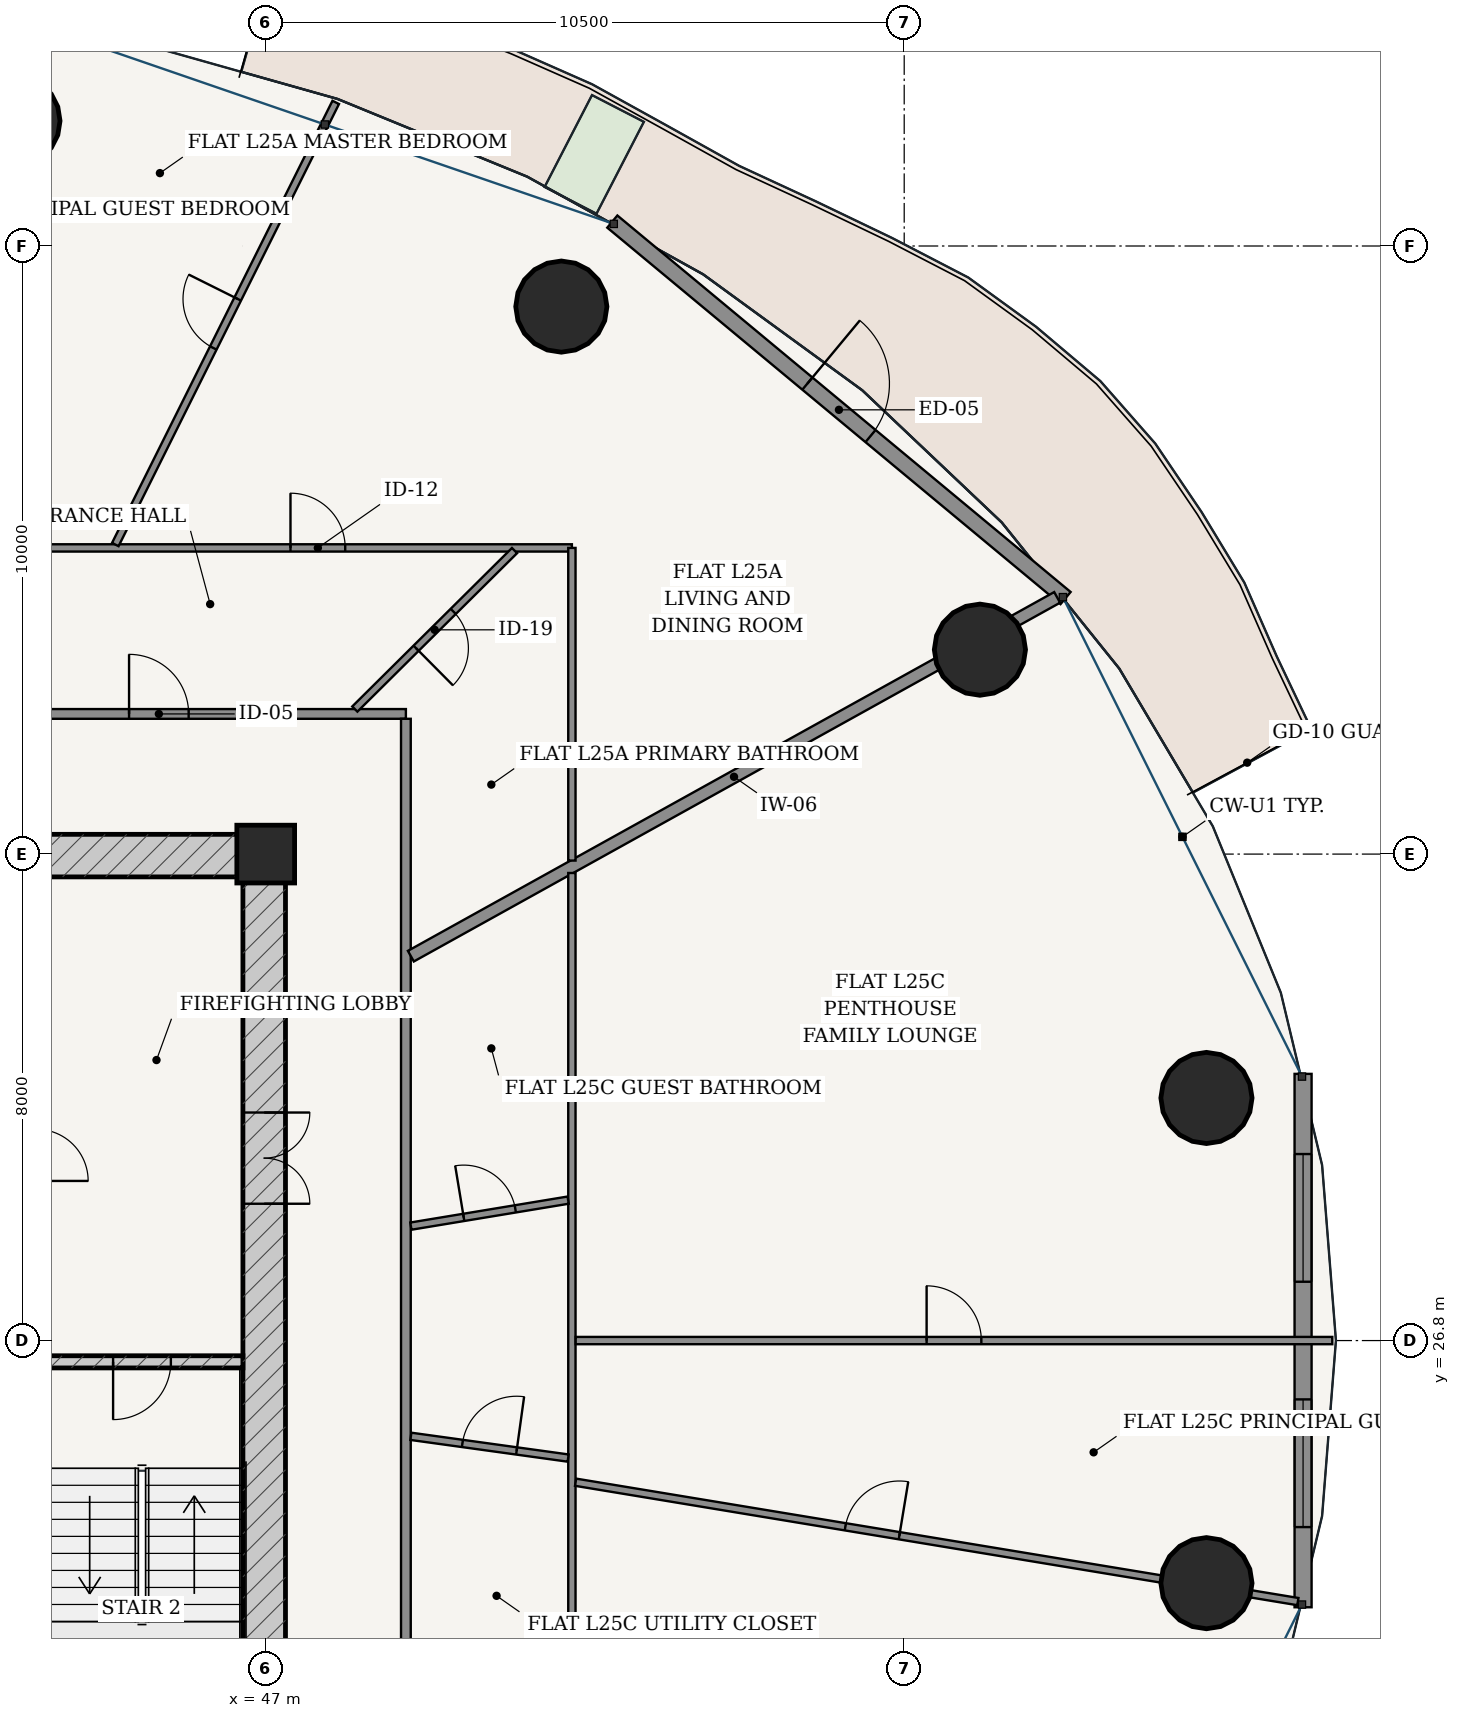
"""IFC4 building model, lengths in metres.
Left out: names, types, materials, properties, quantities, classifications, styles, units other than length and angle.
Written with IfcOpenShell. Run it as: python <this file> out.ifc"""

import sys

from ifc_helpers import new_model, si_unit, direction, frame, frame_2d, origin, origin_2d, place, context, subcontext, project, spatial, rectangle, hollow_circle, extrude, source, transform, mapped, element, fill, save


model = new_model("IFC4")
c1 = context("Model", 3, precision=1e-05, world=origin(), true_north=direction((-0.2419218956, 0.970295726276)))
c2 = subcontext(c1, "Body", "Model", "MODEL_VIEW")
j1 = project(units=[si_unit("LENGTHUNIT", "METRE"), si_unit("PLANEANGLEUNIT", "RADIAN")], contexts=[c1])
p1 = place(None, origin())
s1 = spatial("IfcSite", under=j1, at=p1, CompositionType="ELEMENT")
p2 = place(p1, origin())
s2 = spatial("IfcBuilding", under=s1, at=p2, CompositionType="ELEMENT")
p3 = place(p2, frame((0.0, 0.0, 97.8)))
s3 = spatial("IfcBuildingStorey", under=s2, at=p3, CompositionType="ELEMENT", Elevation=97.8)
p4 = place(p3, frame((47.0, 34.8, 0.0), z_axis=(0.0, 0.0, 1.0), x_axis=(1.0, 0.0, 0.0)))
e1 = element("IfcColumn", 1, at=p4, inside=s3, PredefinedType="COLUMN", context=c2, shape_type="SweptSolid", body=[
    extrude(rectangle(XDim=0.95, YDim=0.95, at=origin_2d()), origin(), (0.0, 0.0, 1.0), 3.6),
])
p5 = place(p3, frame((28.675, 34.775, 0.0), z_axis=(0.0, 0.0, 1.0), x_axis=(1.0, 0.0, 0.0)))
e2 = element("IfcWall", 2, at=p5, inside=s3, PredefinedType="SHEAR", context=c2, shape_type="SweptSolid", body=[
    extrude(rectangle(XDim=18.65, YDim=0.7, at=frame_2d((9.325, 0.0))), origin(), (0.0, 0.0, 1.0), 3.325),
])
p6 = place(p5, frame((8.9, 0.0, 0.0)))
e3 = element("IfcOpeningElement", 3, at=p6, cuts=e2, PredefinedType="OPENING", context=c2, shape_type="SweptSolid", body=[
    extrude(rectangle(XDim=0.85, YDim=2.1, at=frame_2d((0.425, 1.05))), frame((0.0, 0.36, 0.0), z_axis=(0.0, -1.0, 0.0), x_axis=(1.0, 0.0, 0.0)), (0.0, 0.0, 1.0), 0.72),
])
p7 = place(p3, frame((46.975, 19.175, 0.0), z_axis=(0.0, 0.0, 1.0), x_axis=(0.0, 1.0, 0.0)))
e4 = element("IfcWall", 4, at=p7, inside=s3, PredefinedType="SHEAR", context=c2, shape_type="SweptSolid", body=[
    extrude(rectangle(XDim=15.25, YDim=0.7, at=frame_2d((7.625, 0.0))), origin(), (0.0, 0.0, 1.0), 3.325),
])
p8 = place(p7, frame((9.875, 0.0, 0.0)))
e5 = element("IfcOpeningElement", 5, at=p8, cuts=e4, PredefinedType="OPENING", context=c2, shape_type="SweptSolid", body=[
    extrude(rectangle(XDim=1.5, YDim=2.2, at=frame_2d((0.75, 1.1))), frame((0.0, 0.36, 0.0), z_axis=(0.0, -1.0, 0.0), x_axis=(1.0, 0.0, 0.0)), (0.0, 0.0, 1.0), 0.72),
])
p9 = place(p3, frame((43.305, 26.45, 0.0), z_axis=(0.0, 0.0, 1.0), x_axis=(1.0, 0.0, 0.0)))
e6 = element("IfcWall", 6, at=p9, inside=s3, PredefinedType="SOLIDWALL", context=c2, shape_type="SweptSolid", body=[
    extrude(rectangle(XDim=3.32, YDim=0.2, at=frame_2d((1.66, 0.0))), origin(), (0.0, 0.0, 1.0), 3.325),
])
p10 = place(p9, frame((1.185, 0.0, 0.0)))
e7 = element("IfcOpeningElement", 7, at=p10, cuts=e6, PredefinedType="OPENING", context=c2, shape_type="SweptSolid", body=[
    extrude(rectangle(XDim=0.95, YDim=2.15, at=frame_2d((0.475, 1.075))), frame((0.0, 0.11, 0.0), z_axis=(0.0, -1.0, 0.0), x_axis=(1.0, 0.0, 0.0)), (0.0, 0.0, 1.0), 0.22),
])
for number, where, z_axis, x_axis in (
    (8, (62.471, 30.79, 0.0), (0.0, 0.0, 1.0), (1.0, 0.0, 0.0)),
    (9, (58.745, 38.161, 0.0), (0.0, 0.0, 1.0), (1.0, 0.0, 0.0)),
    (10, (51.862, 43.803, 0.0), (0.0, 0.0, 1.0), (1.0, 0.0, 0.0)),
    (11, (42.867, 46.857, 0.0), (0.0, 0.0, 1.0), (1.0, 0.0, 0.0)),
    (12, (62.471, 22.81, 0.0), (0.0, 0.0, 1.0), (1.0, 0.0, 0.0)),
):
    element("IfcColumn", number, at=place(p3, frame(where, z_axis=z_axis, x_axis=x_axis)), inside=s3, PredefinedType="COLUMN", context=c2, shape_type="SweptSolid", body=[
        extrude(hollow_circle(Radius=0.75, WallThickness=0.045, at=origin_2d()), origin(), (0.0, 0.0, 1.0), 3.6),
    ])
p11 = place(p3, frame((60.154, 39.01, 0.0), z_axis=(0.0, 0.0, 1.0), x_axis=(-0.769242574941, 0.638956853706, 0.0)))
e13 = element("IfcWall", 13, at=p11, inside=s3, PredefinedType="SOLIDWALL", context=c2, shape_type="SweptSolid", body=[
    extrude(rectangle(XDim=9.69, YDim=0.26, at=frame_2d((4.845, 0.0))), origin(), (0.0, 0.0, 1.0), 3.325),
])
p12 = place(p11, frame((4.17, 0.0, 0.0)))
e14 = element("IfcOpeningElement", 14, at=p12, cuts=e13, PredefinedType="OPENING", context=c2, shape_type="SweptSolid", body=[
    extrude(rectangle(XDim=1.35, YDim=2.2, at=frame_2d((0.675, 1.1))), frame((0.0, 0.14, 0.0), z_axis=(0.0, -1.0, 0.0), x_axis=(1.0, 0.0, 0.0)), (0.0, 0.0, 1.0), 0.28),
])
p13 = place(p3, frame((64.06, 22.414, 0.0), z_axis=(0.0, 0.0, 1.0), x_axis=(0.0, 1.0, 0.0)))
e15 = element("IfcWall", 15, at=p13, inside=s3, PredefinedType="SOLIDWALL", context=c2, shape_type="SweptSolid", body=[
    extrude(rectangle(XDim=8.771, YDim=0.28, at=frame_2d((4.386, 0.0))), origin(), (0.0, 0.0, 1.0), 3.325),
])
p14 = place(p13, frame((1.318, 0.0, 0.85)))
e16 = element("IfcOpeningElement", 16, at=p14, cuts=e15, PredefinedType="OPENING", context=c2, shape_type="SweptSolid", body=[
    extrude(rectangle(XDim=2.1, YDim=1.95, at=frame_2d((1.05, 0.975))), frame((0.0, 0.15, 0.0), z_axis=(0.0, -1.0, 0.0), x_axis=(1.0, 0.0, 0.0)), (0.0, 0.0, 1.0), 0.3),
])
p15 = place(p13, frame((5.353, 0.0, 0.85)))
e17 = element("IfcOpeningElement", 17, at=p15, cuts=e15, PredefinedType="OPENING", context=c2, shape_type="SweptSolid", body=[
    extrude(rectangle(XDim=2.1, YDim=1.95, at=frame_2d((1.05, 0.975))), frame((0.0, 0.15, 0.0), z_axis=(0.0, -1.0, 0.0), x_axis=(1.0, 0.0, 0.0)), (0.0, 0.0, 1.0), 0.3),
])
p16 = place(p3, frame((26.695, 37.105, 0.0), z_axis=(0.0, 0.0, 1.0), x_axis=(1.0, 0.0, 0.0)))
e18 = element("IfcWall", 18, at=p16, inside=s3, PredefinedType="PARTITIONING", context=c2, shape_type="SweptSolid", body=[
    extrude(rectangle(XDim=22.61, YDim=0.16, at=frame_2d((11.305, 0.0))), origin(), (0.0, 0.0, 1.0), 2.767),
])
p17 = place(p16, frame((18.058, 0.0, 0.0)))
e19 = element("IfcOpeningElement", 19, at=p17, cuts=e18, PredefinedType="OPENING", context=c2, shape_type="SweptSolid", body=[
    extrude(rectangle(XDim=0.98, YDim=2.2, at=frame_2d((0.49, 1.1))), frame((0.0, 0.09, 0.0), z_axis=(0.0, -1.0, 0.0), x_axis=(1.0, 0.0, 0.0)), (0.0, 0.0, 1.0), 0.18),
])
p18 = place(p3, frame((49.305, 16.575, 0.0), z_axis=(0.0, 0.0, 1.0), x_axis=(0.0, 1.0, 0.0)))
e20 = element("IfcWall", 20, at=p18, inside=s3, PredefinedType="PARTITIONING", context=c2, shape_type="SweptSolid", body=[
    extrude(rectangle(XDim=20.45, YDim=0.16, at=frame_2d((10.225, 0.0))), origin(), (0.0, 0.0, 1.0), 2.767),
])
p19 = place(p3, frame((49.387, 33.121, 0.0), z_axis=(0.0, 0.0, 1.0), x_axis=(0.874320165728, 0.485349613992, 0.0)))
e21 = element("IfcWall", 21, at=p19, inside=s3, PredefinedType="PARTITIONING", context=c2, shape_type="SweptSolid", body=[
    extrude(rectangle(XDim=12.156, YDim=0.2, at=frame_2d((6.078, 0.0))), origin(), (0.0, 0.0, 1.0), 2.767),
])
p20 = place(p3, frame((23.965, 39.835, 0.0), z_axis=(0.0, 0.0, 1.0), x_axis=(1.0, 0.0, 0.0)))
e22 = element("IfcWall", 22, at=p20, inside=s3, PredefinedType="PARTITIONING", context=c2, shape_type="SweptSolid", body=[
    extrude(rectangle(XDim=28.07, YDim=0.12, at=frame_2d((14.035, 0.0))), origin(), (0.0, 0.0, 1.0), 2.767),
])
p21 = place(p20, frame((23.442, 0.0, 0.0)))
e23 = element("IfcOpeningElement", 23, at=p21, cuts=e22, PredefinedType="OPENING", context=c2, shape_type="SweptSolid", body=[
    extrude(rectangle(XDim=0.9, YDim=2.15, at=frame_2d((0.45, 1.075))), frame((0.0, 0.07, 0.0), z_axis=(0.0, -1.0, 0.0), x_axis=(1.0, 0.0, 0.0)), (0.0, 0.0, 1.0), 0.14),
])
p22 = place(p3, frame((52.035, 39.835, 0.0), z_axis=(0.0, 0.0, 1.0), x_axis=(0.0, -1.0, 0.0)))
e24 = element("IfcWall", 24, at=p22, inside=s3, PredefinedType="PARTITIONING", context=c2, shape_type="SweptSolid", body=[
    extrude(rectangle(XDim=5.142, YDim=0.12, at=frame_2d((2.571, 0.0))), origin(), (0.0, 0.0, 1.0), 3.004),
])
p23 = place(p3, frame((44.526, 39.89, 0.0), z_axis=(0.0, 0.0, 1.0), x_axis=(0.446167584581, 0.894949432353, 0.0)))
e25 = element("IfcWall", 25, at=p23, inside=s3, PredefinedType="PARTITIONING", context=c2, shape_type="SweptSolid", body=[
    extrude(rectangle(XDim=8.125, YDim=0.12, at=frame_2d((4.062, 0.0))), origin(), (0.0, 0.0, 1.0), 2.767),
])
p24 = place(p23, frame((3.612, 0.0, 0.0)))
e26 = element("IfcOpeningElement", 26, at=p24, cuts=e25, PredefinedType="OPENING", context=c2, shape_type="SweptSolid", body=[
    extrude(rectangle(XDim=0.9, YDim=2.15, at=frame_2d((0.45, 1.075))), frame((0.0, 0.07, 0.0), z_axis=(0.0, -1.0, 0.0), x_axis=(1.0, 0.0, 0.0)), (0.0, 0.0, 1.0), 0.14),
])
p25 = place(p3, frame((48.465, 37.185, 0.0), z_axis=(0.0, 0.0, 1.0), x_axis=(0.709839752998, 0.704363205359, 0.0)))
e27 = element("IfcWall", 27, at=p25, inside=s3, PredefinedType="PARTITIONING", context=c2, shape_type="SweptSolid", body=[
    extrude(rectangle(XDim=3.7, YDim=0.12, at=frame_2d((1.85, 0.0))), origin(), (0.0, 0.0, 1.0), 2.767),
])
p26 = place(p25, frame((1.42, 0.0, 0.0)))
e28 = element("IfcOpeningElement", 28, at=p26, cuts=e27, PredefinedType="OPENING", context=c2, shape_type="SweptSolid", body=[
    extrude(rectangle(XDim=0.86, YDim=2.15, at=frame_2d((0.43, 1.075))), frame((0.0, 0.07, 0.0), z_axis=(0.0, -1.0, 0.0), x_axis=(1.0, 0.0, 0.0)), (0.0, 0.0, 1.0), 0.14),
])
p27 = place(p3, frame((52.035, 34.49, 0.0), z_axis=(0.0, 0.0, 1.0), x_axis=(0.0, -1.0, 0.0)))
e29 = element("IfcWall", 29, at=p27, inside=s3, PredefinedType="PARTITIONING", context=c2, shape_type="SweptSolid", body=[
    extrude(rectangle(XDim=20.725, YDim=0.12, at=frame_2d((10.362, 0.0))), origin(), (0.0, 0.0, 1.0), 2.767),
])
p28 = place(p27, frame((17.493, 0.0, 0.0)))
e30 = element("IfcOpeningElement", 30, at=p28, cuts=e29, PredefinedType="OPENING", context=c2, shape_type="SweptSolid", body=[
    extrude(rectangle(XDim=0.9, YDim=2.15, at=frame_2d((0.45, 1.075))), frame((0.0, 0.07, 0.0), z_axis=(0.0, -1.0, 0.0), x_axis=(1.0, 0.0, 0.0)), (0.0, 0.0, 1.0), 0.14),
])
p29 = place(p27, frame((14.064, 0.0, 0.0)))
e31 = element("IfcOpeningElement", 31, at=p29, cuts=e29, PredefinedType="OPENING", context=c2, shape_type="SweptSolid", body=[
    extrude(rectangle(XDim=0.9, YDim=2.15, at=frame_2d((0.45, 1.075))), frame((0.0, 0.07, 0.0), z_axis=(0.0, -1.0, 0.0), x_axis=(1.0, 0.0, 0.0)), (0.0, 0.0, 1.0), 0.14),
])
p30 = place(p3, frame((52.094, 21.95, 0.0), z_axis=(0.0, 0.0, 1.0), x_axis=(0.945573120726, -0.32540970078, 0.0)))
e32 = element("IfcWall", 32, at=p30, inside=s3, PredefinedType="PARTITIONING", context=c2, shape_type="SweptSolid", body=[
    extrude(rectangle(XDim=11.022, YDim=0.12, at=frame_2d((5.511, 0.0))), origin(), (0.0, 0.0, 1.0), 2.767),
])
p31 = place(p30, frame((5.061, 0.0, 0.0)))
e33 = element("IfcOpeningElement", 33, at=p31, cuts=e32, PredefinedType="OPENING", context=c2, shape_type="SweptSolid", body=[
    extrude(rectangle(XDim=0.9, YDim=2.15, at=frame_2d((0.45, 1.075))), frame((0.0, 0.07, 0.0), z_axis=(0.0, -1.0, 0.0), x_axis=(1.0, 0.0, 0.0)), (0.0, 0.0, 1.0), 0.14),
])
p32 = place(p3, frame((52.096, 24.47, 0.0), z_axis=(0.0, 0.0, 1.0), x_axis=(0.986618264768, -0.163047231274, 0.0)))
e34 = element("IfcWall", 34, at=p32, inside=s3, PredefinedType="PARTITIONING", context=c2, shape_type="SweptSolid", body=[
    extrude(rectangle(XDim=12.039, YDim=0.12, at=frame_2d((6.02, 0.0))), origin(), (0.0, 0.0, 1.0), 2.767),
])
p33 = place(p32, frame((4.496, 0.0, 0.0)))
e35 = element("IfcOpeningElement", 35, at=p33, cuts=e34, PredefinedType="OPENING", context=c2, shape_type="SweptSolid", body=[
    extrude(rectangle(XDim=0.9, YDim=2.15, at=frame_2d((0.45, 1.075))), frame((0.0, 0.07, 0.0), z_axis=(0.0, -1.0, 0.0), x_axis=(1.0, 0.0, 0.0)), (0.0, 0.0, 1.0), 0.14),
])
p34 = place(p3, frame((52.097, 26.8, 0.0), z_axis=(0.0, 0.0, 1.0), x_axis=(1.0, 0.0, 0.0)))
e36 = element("IfcWall", 36, at=p34, inside=s3, PredefinedType="PARTITIONING", context=c2, shape_type="SweptSolid", body=[
    extrude(rectangle(XDim=12.443, YDim=0.12, at=frame_2d((6.222, 0.0))), origin(), (0.0, 0.0, 1.0), 2.767),
])
p35 = place(p34, frame((5.771, 0.0, 0.0)))
e37 = element("IfcOpeningElement", 37, at=p35, cuts=e36, PredefinedType="OPENING", context=c2, shape_type="SweptSolid", body=[
    extrude(rectangle(XDim=0.9, YDim=2.15, at=frame_2d((0.45, 1.075))), frame((0.0, 0.07, 0.0), z_axis=(0.0, -1.0, 0.0), x_axis=(1.0, 0.0, 0.0)), (0.0, 0.0, 1.0), 0.14),
])
p36 = place(p3, frame((49.387, 25.225, 0.0), z_axis=(0.0, 0.0, 1.0), x_axis=(0.990575253555, -0.136969584375, 0.0)))
e38 = element("IfcWall", 38, at=p36, inside=s3, PredefinedType="PARTITIONING", context=c2, shape_type="SweptSolid", body=[
    extrude(rectangle(XDim=2.611, YDim=0.12, at=frame_2d((1.306, 0.0))), origin(), (0.0, 0.0, 1.0), 3.325),
])
p37 = place(p36, frame((0.856, 0.0, 0.0)))
e39 = element("IfcOpeningElement", 39, at=p37, cuts=e38, PredefinedType="OPENING", context=c2, shape_type="SweptSolid", body=[
    extrude(rectangle(XDim=0.9, YDim=2.15, at=frame_2d((0.45, 1.075))), frame((0.0, 0.07, 0.0), z_axis=(0.0, -1.0, 0.0), x_axis=(1.0, 0.0, 0.0)), (0.0, 0.0, 1.0), 0.14),
])
p38 = place(p3, frame((49.387, 28.682, 0.0), z_axis=(0.0, 0.0, 1.0), x_axis=(0.986619477472, 0.163039892889, 0.0)))
e40 = element("IfcWall", 40, at=p38, inside=s3, PredefinedType="PARTITIONING", context=c2, shape_type="SweptSolid", body=[
    extrude(rectangle(XDim=2.622, YDim=0.12, at=frame_2d((1.311, 0.0))), origin(), (0.0, 0.0, 1.0), 2.767),
])
p39 = place(p38, frame((0.881, 0.0, 0.0)))
e41 = element("IfcOpeningElement", 41, at=p39, cuts=e40, PredefinedType="OPENING", context=c2, shape_type="SweptSolid", body=[
    extrude(rectangle(XDim=0.86, YDim=2.15, at=frame_2d((0.43, 1.075))), frame((0.0, 0.07, 0.0), z_axis=(0.0, -1.0, 0.0), x_axis=(1.0, 0.0, 0.0)), (0.0, 0.0, 1.0), 0.14),
])
m1 = source(origin(), c2, "Body", "SweptSolid", [
    extrude(rectangle(XDim=1.35, YDim=2.2, at=frame_2d((0.675, 1.1))), frame((0.0, 0.025, 0.0), z_axis=(0.0, -1.0, 0.0), x_axis=(1.0, 0.0, 0.0)), (0.0, 0.0, 1.0), 0.05),
])
p40 = place(p12, frame((1.35, 0.0, 0.0), z_axis=(0.0, 0.0, 1.0), x_axis=(-1.0, 0.0, 0.0)))
e42 = element("IfcDoor", 42, at=p40, inside=s3, OperationType="SINGLE_SWING_LEFT", PredefinedType="DOOR", context=c2, shape_type="MappedRepresentation", body=[
    mapped(m1, transform((0.0, 0.0, 0.0), scale=1.0)),
])
fill(e14, e42)
m2 = source(origin(), c2, "Body", "SweptSolid", [
    extrude(rectangle(XDim=2.1, YDim=1.95, at=frame_2d((1.05, 0.975))), frame((0.0, 0.03, 0.0), z_axis=(0.0, -1.0, 0.0), x_axis=(1.0, 0.0, 0.0)), (0.0, 0.0, 1.0), 0.06),
])
p41 = place(p14, origin())
e43 = element("IfcWindow", 43, at=p41, inside=s3, PartitioningType="SINGLE_PANEL", PredefinedType="WINDOW", context=c2, shape_type="MappedRepresentation", body=[
    mapped(m2, transform((0.0, 0.0, 0.0), scale=1.0)),
])
fill(e16, e43)
p42 = place(p15, origin())
e44 = element("IfcWindow", 44, at=p42, inside=s3, PartitioningType="SINGLE_PANEL", PredefinedType="WINDOW", context=c2, shape_type="MappedRepresentation", body=[
    mapped(m2, transform((0.0, 0.0, 0.0), scale=1.0)),
])
fill(e17, e44)
m3 = source(origin(), c2, "Body", "SweptSolid", [
    extrude(rectangle(XDim=1.5, YDim=2.2, at=frame_2d((0.75, 1.1))), frame((0.0, 0.025, 0.0), z_axis=(0.0, -1.0, 0.0), x_axis=(1.0, 0.0, 0.0)), (0.0, 0.0, 1.0), 0.05),
])
p43 = place(p8, frame((1.5, 0.0, 0.0), z_axis=(0.0, 0.0, 1.0), x_axis=(-1.0, 0.0, 0.0)))
e45 = element("IfcDoor", 45, at=p43, inside=s3, OperationType="DOUBLE_DOOR_SINGLE_SWING", PredefinedType="DOOR", context=c2, shape_type="MappedRepresentation", body=[
    mapped(m3, transform((0.0, 0.0, 0.0), scale=1.0)),
])
fill(e5, e45)
m4 = source(origin(), c2, "Body", "SweptSolid", [
    extrude(rectangle(XDim=0.95, YDim=2.15, at=frame_2d((0.475, 1.075))), frame((0.0, 0.025, 0.0), z_axis=(0.0, -1.0, 0.0), x_axis=(1.0, 0.0, 0.0)), (0.0, 0.0, 1.0), 0.05),
])
p44 = place(p10, frame((0.95, 0.0, 0.0), z_axis=(0.0, 0.0, 1.0), x_axis=(-1.0, 0.0, 0.0)))
e46 = element("IfcDoor", 46, at=p44, inside=s3, OperationType="SINGLE_SWING_RIGHT", PredefinedType="DOOR", context=c2, shape_type="MappedRepresentation", body=[
    mapped(m4, transform((0.0, 0.0, 0.0), scale=1.0)),
])
fill(e7, e46)
m5 = source(origin(), c2, "Body", "SweptSolid", [
    extrude(rectangle(XDim=0.98, YDim=2.2, at=frame_2d((0.49, 1.1))), frame((0.0, 0.025, 0.0), z_axis=(0.0, -1.0, 0.0), x_axis=(1.0, 0.0, 0.0)), (0.0, 0.0, 1.0), 0.05),
])
p45 = place(p17, origin())
e47 = element("IfcDoor", 47, at=p45, inside=s3, OperationType="SINGLE_SWING_LEFT", PredefinedType="DOOR", context=c2, shape_type="MappedRepresentation", body=[
    mapped(m5, transform((0.0, 0.0, 0.0), scale=1.0)),
])
fill(e19, e47)
m6 = source(origin(), c2, "Body", "SweptSolid", [
    extrude(rectangle(XDim=0.86, YDim=2.15, at=frame_2d((0.43, 1.075))), frame((0.0, 0.025, 0.0), z_axis=(0.0, -1.0, 0.0), x_axis=(1.0, 0.0, 0.0)), (0.0, 0.0, 1.0), 0.05),
])
p46 = place(p26, frame((0.86, 0.0, 0.0), z_axis=(0.0, 0.0, 1.0), x_axis=(-1.0, 0.0, 0.0)))
e48 = element("IfcDoor", 48, at=p46, inside=s3, OperationType="SINGLE_SWING_RIGHT", PredefinedType="DOOR", context=c2, shape_type="MappedRepresentation", body=[
    mapped(m6, transform((0.0, 0.0, 0.0), scale=1.0)),
])
fill(e28, e48)
m7 = source(origin(), c2, "Body", "SweptSolid", [
    extrude(rectangle(XDim=0.9, YDim=2.15, at=frame_2d((0.45, 1.075))), frame((0.0, 0.025, 0.0), z_axis=(0.0, -1.0, 0.0), x_axis=(1.0, 0.0, 0.0)), (0.0, 0.0, 1.0), 0.05),
])
p47 = place(p21, origin())
e49 = element("IfcDoor", 49, at=p47, inside=s3, OperationType="SINGLE_SWING_LEFT", PredefinedType="DOOR", context=c2, shape_type="MappedRepresentation", body=[
    mapped(m7, transform((0.0, 0.0, 0.0), scale=1.0)),
])
fill(e23, e49)
p48 = place(p24, origin())
e50 = element("IfcDoor", 50, at=p48, inside=s3, OperationType="SINGLE_SWING_RIGHT", PredefinedType="DOOR", context=c2, shape_type="MappedRepresentation", body=[
    mapped(m7, transform((0.0, 0.0, 0.0), scale=1.0)),
])
fill(e26, e50)
p49 = place(p37, origin())
e51 = element("IfcDoor", 51, at=p49, inside=s3, OperationType="SINGLE_SWING_RIGHT", PredefinedType="DOOR", context=c2, shape_type="MappedRepresentation", body=[
    mapped(m7, transform((0.0, 0.0, 0.0), scale=1.0)),
])
fill(e39, e51)
p50 = place(p39, origin())
e52 = element("IfcDoor", 52, at=p50, inside=s3, OperationType="SINGLE_SWING_LEFT", PredefinedType="DOOR", context=c2, shape_type="MappedRepresentation", body=[
    mapped(m6, transform((0.0, 0.0, 0.0), scale=1.0)),
])
fill(e41, e52)
p51 = place(p33, origin())
e53 = element("IfcDoor", 53, at=p51, inside=s3, OperationType="SINGLE_SWING_RIGHT", PredefinedType="DOOR", context=c2, shape_type="MappedRepresentation", body=[
    mapped(m7, transform((0.0, 0.0, 0.0), scale=1.0)),
])
fill(e35, e53)
p52 = place(p35, origin())
e54 = element("IfcDoor", 54, at=p52, inside=s3, OperationType="SINGLE_SWING_LEFT", PredefinedType="DOOR", context=c2, shape_type="MappedRepresentation", body=[
    mapped(m7, transform((0.0, 0.0, 0.0), scale=1.0)),
])
fill(e37, e54)
save(model, sys.argv[1])
